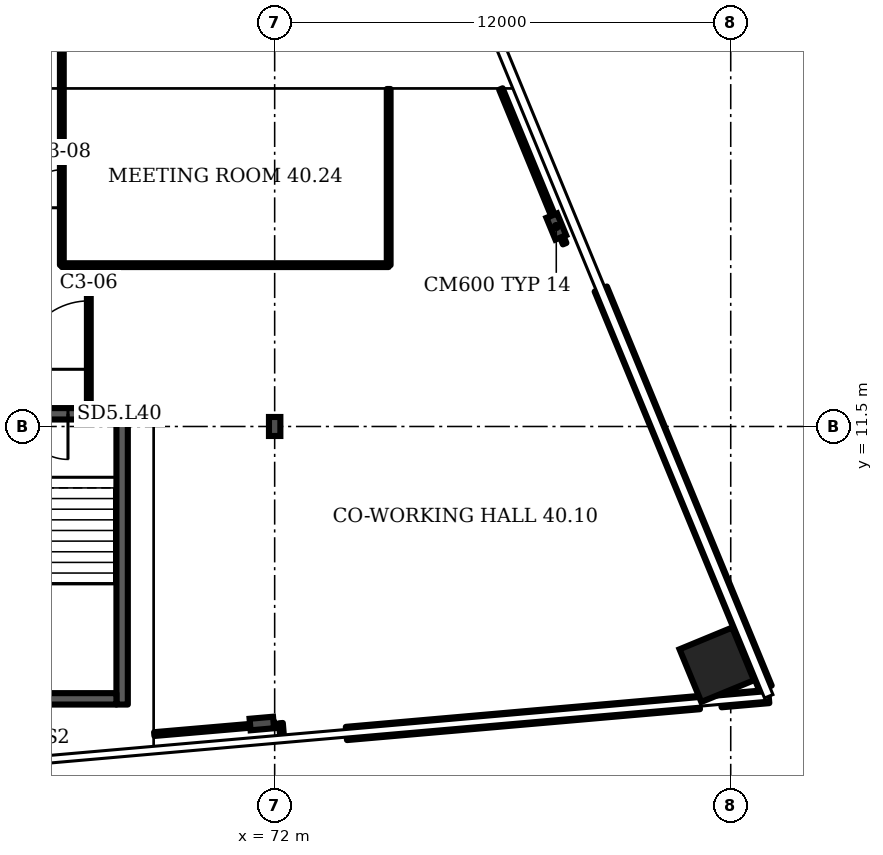
"""IFC4 building model, lengths in metres.
Left out: names, types, materials, properties, quantities, classifications, styles, units other than length and angle.
Written with IfcOpenShell. Run it as: python <this file> out.ifc"""

import sys

from ifc_helpers import new_model, si_unit, direction, frame, frame_2d, origin, origin_2d, place, context, subcontext, project, spatial, rectangle, i_section, extrude, element, fill, save


model = new_model("IFC4")
c1 = context("Model", 3, precision=1e-05, world=origin(), true_north=direction((0.0, 1.0)))
c2 = subcontext(c1, "Body", "Model", "MODEL_VIEW")
j1 = project(units=[si_unit("LENGTHUNIT", "METRE"), si_unit("PLANEANGLEUNIT", "RADIAN")], contexts=[c1])
p1 = place(None, origin())
s1 = spatial("IfcSite", under=j1, at=p1, CompositionType="ELEMENT")
p2 = place(p1, origin())
s2 = spatial("IfcBuilding", under=s1, at=p2, CompositionType="ELEMENT")
p3 = place(p2, frame((0.0, 0.0, 166.3)))
s3 = spatial("IfcBuildingStorey", under=s2, at=p3, CompositionType="ELEMENT", Elevation=166.3)
p4 = place(p3, frame((83.633, 5.231, 0.0), z_axis=(0.0, 0.0, 1.0), x_axis=(-0.381602, 0.924325, 0.0)))
e1 = element("IfcColumn", 1, at=p4, inside=s3, PredefinedType="COLUMN", context=c2, shape_type="SweptSolid", body=[
    extrude(rectangle(XDim=1.5, YDim=1.5, at=origin_2d()), origin(), (0.0, 0.0, 1.0), 3.6),
])
for number, where, z_axis, x_axis in (
    (2, (71.662, 3.685, 0.0), (0.0, 0.0, 1.0), (0.087, -0.996, 0.0)),
    (3, (79.41, 16.762, 0.0), (0.0, 0.0, 1.0), (0.924, 0.382, 0.0)),
):
    element("IfcColumn", number, at=place(p3, frame(where, z_axis=z_axis, x_axis=x_axis)), inside=s3, PredefinedType="COLUMN", context=c2, shape_type="SweptSolid", body=[
        extrude(i_section(OverallWidth=0.305, OverallDepth=0.62, WebThickness=0.021, FlangeThickness=0.04, FilletRadius=0.027, at=origin_2d()), origin(), (0.0, 0.0, 1.0), 3.6),
    ])
p5 = place(p3, frame((72.0, 11.5, 0.0), z_axis=(0.0, 0.0, 1.0), x_axis=(1.0, 0.0, 0.0)))
e4 = element("IfcColumn", 4, at=p5, inside=s3, PredefinedType="COLUMN", context=c2, shape_type="SweptSolid", body=[
    extrude(i_section(OverallWidth=0.3, OverallDepth=0.5, WebThickness=0.014, FlangeThickness=0.028, FilletRadius=0.027, at=origin_2d()), origin(), (0.0, 0.0, 1.0), 3.6),
])
p6 = place(p3, frame((73.887, 3.423, 0.0), z_axis=(0.0, 0.0, 1.0), x_axis=(0.996197, 0.087145, 0.0)))
e5 = element("IfcWall", 5, at=p6, inside=s3, PredefinedType="SOLIDWALL", context=c2, shape_type="SweptSolid", body=[
    extrude(rectangle(XDim=9.323, YDim=0.35, at=frame_2d((4.662, 0.0))), origin(), (0.0, 0.0, 1.0), 1.0),
])
p7 = place(p3, frame((83.745, 4.285, 0.0), z_axis=(0.0, 0.0, 1.0), x_axis=(0.996198, 0.087148, 0.0)))
e6 = element("IfcWall", 6, at=p7, inside=s3, PredefinedType="SOLIDWALL", context=c2, shape_type="SweptSolid", body=[
    extrude(rectangle(XDim=1.261, YDim=0.35, at=frame_2d((0.63, 0.0))), origin(), (0.0, 0.0, 1.0), 1.0),
])
p8 = place(p3, frame((84.916, 4.616, 0.0), z_axis=(0.0, 0.0, 1.0), x_axis=(-0.381598, 0.924328, 0.0)))
e7 = element("IfcWall", 7, at=p8, inside=s3, PredefinedType="SOLIDWALL", context=c2, shape_type="SweptSolid", body=[
    extrude(rectangle(XDim=11.361, YDim=0.35, at=frame_2d((5.68, 0.0))), origin(), (0.0, 0.0, 1.0), 1.0),
])
p9 = place(p3, frame((63.786, 11.834, 0.0), z_axis=(0.0, 0.0, 1.0), x_axis=(1.0, 0.0, 0.0)))
e8 = element("IfcWall", 8, at=p9, inside=s3, PredefinedType="SHEAR", context=c2, shape_type="SweptSolid", body=[
    extrude(rectangle(XDim=4.35, YDim=0.3, at=frame_2d((2.175, 0.0))), origin(), (0.0, 0.0, 1.0), 3.2),
])
p10 = place(p9, frame((1.575, 0.0, 0.0)))
e9 = element("IfcOpeningElement", 9, at=p10, cuts=e8, PredefinedType="OPENING", context=c2, shape_type="SweptSolid", body=[
    extrude(rectangle(XDim=1.2, YDim=2.1, at=frame_2d((0.6, 1.05))), frame((0.0, 0.16, 0.0), z_axis=(0.0, -1.0, 0.0), x_axis=(1.0, 0.0, 0.0)), (0.0, 0.0, 1.0), 0.32),
])
p11 = place(p3, frame((66.4, 15.745, 0.0), z_axis=(0.0, 0.0, 1.0), x_axis=(0.0, 1.0, 0.0)))
e10 = element("IfcWall", 10, at=p11, inside=s3, PredefinedType="PARTITIONING", context=c2, shape_type="SweptSolid", body=[
    extrude(rectangle(XDim=5.98, YDim=0.1, at=frame_2d((2.99, 0.0))), origin(), (0.0, 0.0, 1.0), 3.2),
])
p12 = place(p11, frame((1.51, 0.0, 0.0)))
e11 = element("IfcOpeningElement", 11, at=p12, cuts=e10, PredefinedType="OPENING", context=c2, shape_type="SweptSolid", body=[
    extrude(rectangle(XDim=1.0, YDim=2.1, at=frame_2d((0.5, 1.05))), frame((0.0, 0.06, 0.0), z_axis=(0.0, -1.0, 0.0), x_axis=(1.0, 0.0, 0.0)), (0.0, 0.0, 1.0), 0.12),
])
p13 = place(p3, frame((66.4, 15.745, 0.0), z_axis=(0.0, 0.0, 1.0), x_axis=(1.0, 0.0, 0.0)))
e12 = element("IfcWall", 12, at=p13, inside=s3, PredefinedType="PARTITIONING", context=c2, shape_type="SweptSolid", body=[
    extrude(rectangle(XDim=8.6, YDim=0.1, at=frame_2d((4.3, 0.0))), origin(), (0.0, 0.0, 1.0), 3.2),
])
p14 = place(p3, frame((67.11, 12.004, 0.0), z_axis=(0.0, 0.0, 1.0), x_axis=(0.0, 1.0, 0.0)))
e13 = element("IfcWall", 13, at=p14, inside=s3, PredefinedType="PARTITIONING", context=c2, shape_type="SweptSolid", body=[
    extrude(rectangle(XDim=3.741, YDim=0.1, at=frame_2d((1.871, 0.0))), origin(), (0.0, 0.0, 1.0), 3.2),
])
p15 = place(p14, frame((1.001, 0.0, 0.0)))
e14 = element("IfcOpeningElement", 14, at=p15, cuts=e13, PredefinedType="OPENING", context=c2, shape_type="SweptSolid", body=[
    extrude(rectangle(XDim=1.8, YDim=2.1, at=frame_2d((0.9, 1.05))), frame((0.0, 0.06, 0.0), z_axis=(0.0, -1.0, 0.0), x_axis=(1.0, 0.0, 0.0)), (0.0, 0.0, 1.0), 0.12),
])
p16 = place(p3, frame((68.831, 3.407, 0.0), z_axis=(0.0, 0.0, 1.0), x_axis=(0.996308, 0.085898, 0.0)))
e15 = element("IfcWall", 15, at=p16, inside=s3, PredefinedType="PARTITIONING", context=c2, shape_type="SweptSolid", body=[
    extrude(rectangle(XDim=3.18, YDim=0.1, at=frame_2d((1.59, 0.0))), origin(), (0.0, 0.0, 1.0), 2.58),
])
p17 = place(p3, frame((72.198, 3.3, 0.0), z_axis=(0.0, 0.0, 1.0), x_axis=(-0.083759, 0.996486, 0.0)))
e16 = element("IfcWall", 16, at=p17, inside=s3, PredefinedType="PARTITIONING", context=c2, shape_type="SweptSolid", body=[
    extrude(rectangle(XDim=0.396, YDim=0.1, at=frame_2d((0.198, 0.0))), origin(), (0.0, 0.0, 1.0), 3.2),
])
p18 = place(p3, frame((75.0, 15.745, 0.0), z_axis=(0.0, 0.0, 1.0), x_axis=(0.0, 1.0, 0.0)))
e17 = element("IfcWall", 17, at=p18, inside=s3, PredefinedType="PARTITIONING", context=c2, shape_type="SweptSolid", body=[
    extrude(rectangle(XDim=4.635, YDim=0.1, at=frame_2d((2.317, 0.0))), origin(), (0.0, 0.0, 1.0), 3.2),
])
p19 = place(p3, frame((79.63, 16.31, 0.0), z_axis=(0.0, 0.0, 1.0), x_axis=(-0.380933, 0.9246, 0.0)))
e18 = element("IfcWall", 18, at=p19, inside=s3, PredefinedType="PARTITIONING", context=c2, shape_type="SweptSolid", body=[
    extrude(rectangle(XDim=4.402, YDim=0.1, at=frame_2d((2.201, 0.0))), origin(), (0.0, 0.0, 1.0), 2.58),
])
p20 = place(p3, frame((67.986, 4.184, 0.0), z_axis=(0.0, 0.0, 1.0), x_axis=(0.0, 1.0, 0.0)))
e19 = element("IfcWall", 19, at=p20, inside=s3, PredefinedType="SHEAR", context=c2, shape_type="SweptSolid", body=[
    extrude(rectangle(XDim=7.5, YDim=0.3, at=frame_2d((3.75, 0.0))), origin(), (0.0, 0.0, 1.0), 3.2),
])
p21 = place(p3, frame((64.086, 4.334, 0.0), z_axis=(0.0, 0.0, 1.0), x_axis=(1.0, 0.0, 0.0)))
e20 = element("IfcWall", 20, at=p21, inside=s3, PredefinedType="SHEAR", context=c2, shape_type="SweptSolid", body=[
    extrude(rectangle(XDim=3.75, YDim=0.3, at=frame_2d((1.875, 0.0))), origin(), (0.0, 0.0, 1.0), 3.2),
])
p22 = place(p10, origin())
e21 = element("IfcDoor", 21, at=p22, inside=s3, OperationType="SINGLE_SWING_RIGHT", PredefinedType="DOOR", context=c2, shape_type="SweptSolid", body=[
    extrude(rectangle(XDim=1.2, YDim=2.1, at=frame_2d((0.6, 1.05))), frame((0.0, 0.025, 0.0), z_axis=(0.0, -1.0, 0.0), x_axis=(1.0, 0.0, 0.0)), (0.0, 0.0, 1.0), 0.05),
])
fill(e9, e21)
p23 = place(p15, origin())
e22 = element("IfcDoor", 22, at=p23, inside=s3, OperationType="DOUBLE_DOOR_SINGLE_SWING", PredefinedType="DOOR", context=c2, shape_type="SweptSolid", body=[
    extrude(rectangle(XDim=1.8, YDim=2.1, at=frame_2d((0.9, 1.05))), frame((0.0, 0.025, 0.0), z_axis=(0.0, -1.0, 0.0), x_axis=(1.0, 0.0, 0.0)), (0.0, 0.0, 1.0), 0.05),
])
fill(e14, e22)
p24 = place(p12, origin())
e23 = element("IfcDoor", 23, at=p24, inside=s3, OperationType="SINGLE_SWING_LEFT", PredefinedType="DOOR", context=c2, shape_type="SweptSolid", body=[
    extrude(rectangle(XDim=1.0, YDim=2.1, at=frame_2d((0.5, 1.05))), frame((0.0, 0.025, 0.0), z_axis=(0.0, -1.0, 0.0), x_axis=(1.0, 0.0, 0.0)), (0.0, 0.0, 1.0), 0.05),
])
fill(e11, e23)
save(model, sys.argv[1])
